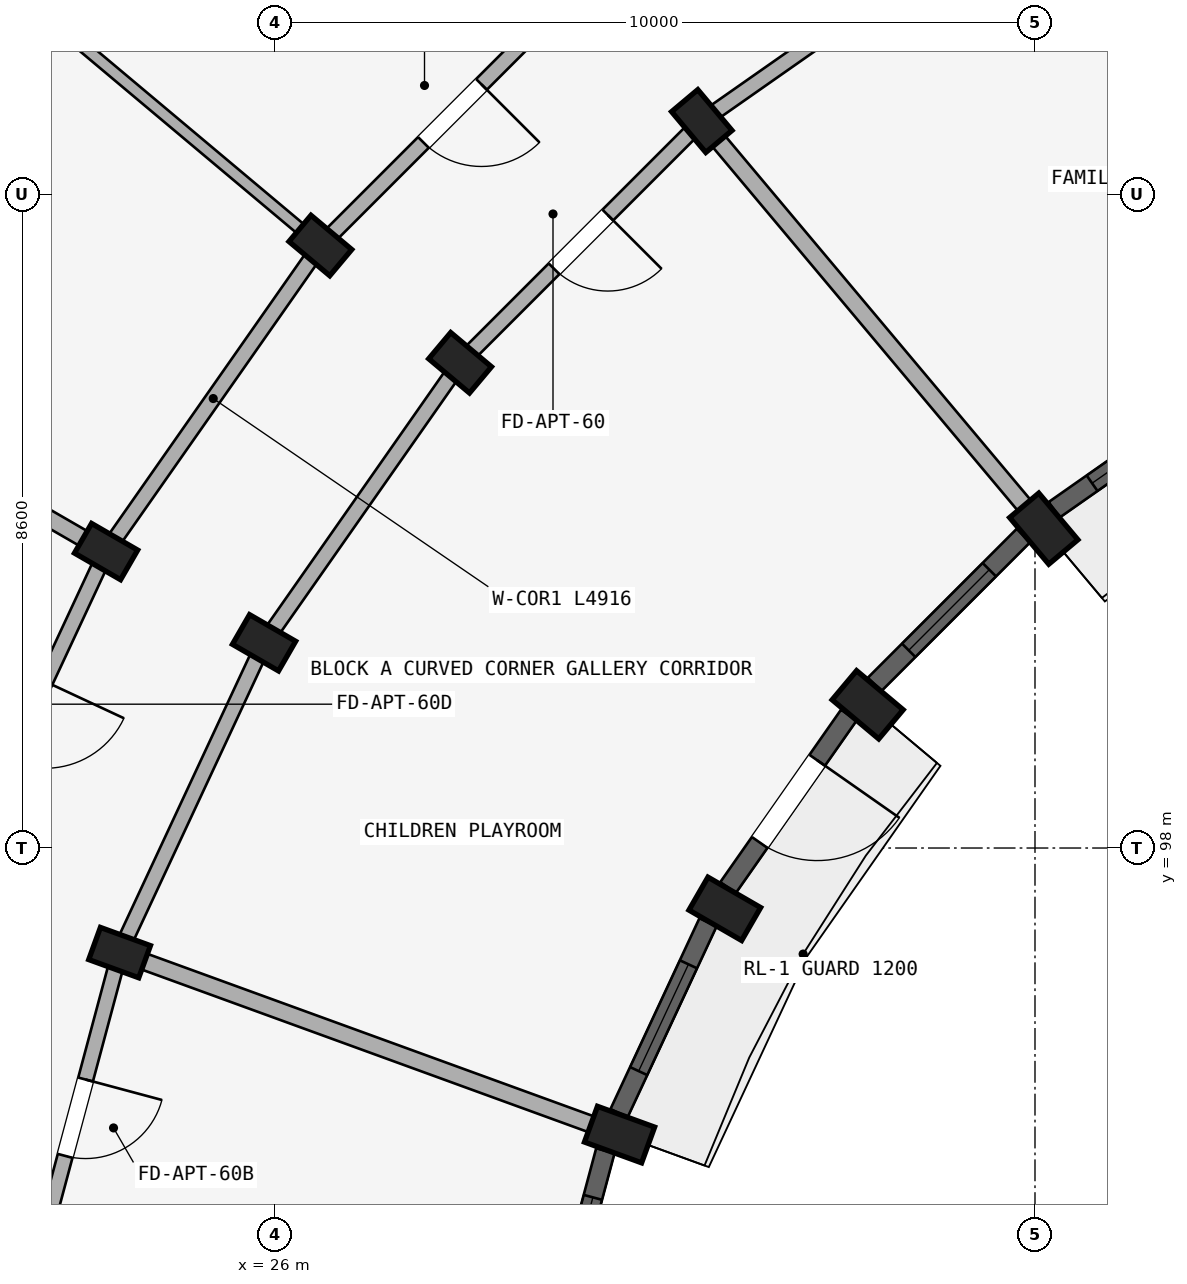
"""IFC4 building model, lengths in metres.
Left out: names, types, materials, properties, quantities, classifications, styles, units other than length and angle.
Written with IfcOpenShell. Run it as: python <this file> out.ifc"""

import sys

from ifc_helpers import new_model, si_unit, direction, frame, frame_2d, origin, origin_2d, place, context, subcontext, project, spatial, rectangle, extrude, element, fill, save


model = new_model("IFC4")
c1 = context("Model", 3, precision=1e-05, world=origin(), true_north=direction((0.0, 1.0)))
c2 = subcontext(c1, "Body", "Model", "MODEL_VIEW")
j1 = project(units=[si_unit("LENGTHUNIT", "METRE"), si_unit("PLANEANGLEUNIT", "RADIAN")], contexts=[c1])
p1 = place(None, origin())
s1 = spatial("IfcSite", under=j1, at=p1, CompositionType="ELEMENT")
p2 = place(p1, origin())
s2 = spatial("IfcBuilding", under=s1, at=p2, CompositionType="ELEMENT")
p3 = place(p2, frame((0.0, 0.0, 21.3)))
s3 = spatial("IfcBuildingStorey", under=s2, at=p3, CompositionType="ELEMENT", Elevation=21.3)
p4 = place(p3, frame((36.115, 102.202, 0.0), z_axis=(0.0, 0.0, 1.0), x_axis=(0.766044443119, 0.642787609687, 0.0)))
e1 = element("IfcColumn", 1, at=p4, inside=s3, PredefinedType="COLUMN", context=c2, shape_type="SweptSolid", body=[
    extrude(rectangle(XDim=0.5, YDim=0.8, at=origin_2d()), origin(), (0.0, 0.0, 1.0), 2.93),
])
p5 = place(p3, frame((31.616, 107.564, 0.0), z_axis=(0.0, 0.0, 1.0), x_axis=(0.766044443119, 0.642787609687, 0.0)))
e2 = element("IfcColumn", 2, at=p5, inside=s3, PredefinedType="COLUMN", context=c2, shape_type="SweptSolid", body=[
    extrude(rectangle(XDim=0.45, YDim=0.7, at=origin_2d()), origin(), (0.0, 0.0, 1.0), 2.93),
])
p6 = place(p3, frame((33.798, 99.885, 0.0), z_axis=(0.0, 0.0, 1.0), x_axis=(0.642787609687, 0.766044443119, 0.0)))
e3 = element("IfcColumn", 3, at=p6, inside=s3, PredefinedType="COLUMN", context=c2, shape_type="SweptSolid", body=[
    extrude(rectangle(XDim=0.5, YDim=0.8, at=origin_2d()), origin(), (0.0, 0.0, 1.0), 2.93),
])
for number, where, z_axis, x_axis in (
    (4, (28.436, 104.384, 0.0), (0.0, 0.0, 1.0), (0.643, 0.766, 0.0)),
    (5, (26.598, 105.927, 0.0), (0.0, 0.0, 1.0), (0.643, 0.766, 0.0)),
):
    element("IfcColumn", number, at=place(p3, frame(where, z_axis=z_axis, x_axis=x_axis)), inside=s3, PredefinedType="COLUMN", context=c2, shape_type="SweptSolid", body=[
        extrude(rectangle(XDim=0.45, YDim=0.7, at=origin_2d()), origin(), (0.0, 0.0, 1.0), 2.93),
    ])
p7 = place(p3, frame((31.919, 97.2, 0.0), z_axis=(0.0, 0.0, 1.0), x_axis=(0.5, 0.866025403784, 0.0)))
e6 = element("IfcColumn", 6, at=p7, inside=s3, PredefinedType="COLUMN", context=c2, shape_type="SweptSolid", body=[
    extrude(rectangle(XDim=0.5, YDim=0.8, at=origin_2d()), origin(), (0.0, 0.0, 1.0), 2.93),
])
for number, where, z_axis, x_axis in (
    (7, (25.856, 100.7, 0.0), (0.0, 0.0, 1.0), (0.5, 0.866, 0.0)),
    (8, (23.778, 101.9, 0.0), (0.0, 0.0, 1.0), (0.5, 0.866, 0.0)),
):
    element("IfcColumn", number, at=place(p3, frame(where, z_axis=z_axis, x_axis=x_axis)), inside=s3, PredefinedType="COLUMN", context=c2, shape_type="SweptSolid", body=[
        extrude(rectangle(XDim=0.45, YDim=0.7, at=origin_2d()), origin(), (0.0, 0.0, 1.0), 2.93),
    ])
p8 = place(p3, frame((30.534, 94.23, 0.0), z_axis=(0.0, 0.0, 1.0), x_axis=(0.342020143326, 0.939692620786, 0.0)))
e9 = element("IfcColumn", 9, at=p8, inside=s3, PredefinedType="COLUMN", context=c2, shape_type="SweptSolid", body=[
    extrude(rectangle(XDim=0.5, YDim=0.8, at=origin_2d()), origin(), (0.0, 0.0, 1.0), 2.93),
])
p9 = place(p3, frame((23.956, 96.624, 0.0), z_axis=(0.0, 0.0, 1.0), x_axis=(0.342020143326, 0.939692620786, 0.0)))
e10 = element("IfcColumn", 10, at=p9, inside=s3, PredefinedType="COLUMN", context=c2, shape_type="SweptSolid", body=[
    extrude(rectangle(XDim=0.45, YDim=0.7, at=origin_2d()), origin(), (0.0, 0.0, 1.0), 2.93),
])
p10 = place(p3, frame((35.3, 110.144, 0.0), z_axis=(0.0, 0.0, 1.0), x_axis=(-0.819155404658, -0.573571637217, 0.0)))
e11 = element("IfcWall", 11, at=p10, inside=s3, PredefinedType="STANDARD", context=c2, shape_type="SweptSolid", body=[
    extrude(rectangle(XDim=4.497, YDim=0.2, at=frame_2d((2.249, 0.0))), origin(), (0.0, 0.0, 1.0), 2.372),
])
p11 = place(p3, frame((31.616, 107.564, 0.0), z_axis=(0.0, 0.0, 1.0), x_axis=(-0.707106781187, -0.707106781187, 0.0)))
e12 = element("IfcWall", 12, at=p11, inside=s3, PredefinedType="STANDARD", context=c2, shape_type="SweptSolid", body=[
    extrude(rectangle(XDim=4.497, YDim=0.2, at=frame_2d((2.249, 0.0))), origin(), (0.0, 0.0, 1.0), 2.372),
])
p12 = place(p11, frame((1.749, 0.0, 0.0)))
e13 = element("IfcOpeningElement", 13, at=p12, cuts=e12, PredefinedType="OPENING", context=c2, shape_type="SweptSolid", body=[
    extrude(rectangle(XDim=1.0, YDim=2.15, at=frame_2d((0.5, 1.075))), frame((0.0, 0.11, 0.0), z_axis=(0.0, -1.0, 0.0), x_axis=(1.0, 0.0, 0.0)), (0.0, 0.0, 1.0), 0.22),
])
p13 = place(p3, frame((30.073, 109.402, 0.0), z_axis=(0.0, 0.0, 1.0), x_axis=(-0.707106781187, -0.707106781187, 0.0)))
e14 = element("IfcWall", 14, at=p13, inside=s3, PredefinedType="STANDARD", context=c2, shape_type="SweptSolid", body=[
    extrude(rectangle(XDim=4.916, YDim=0.2, at=frame_2d((2.458, 0.0))), origin(), (0.0, 0.0, 1.0), 2.372),
])
p14 = place(p13, frame((1.918, 0.0, 0.0)))
e15 = element("IfcOpeningElement", 15, at=p14, cuts=e14, PredefinedType="OPENING", context=c2, shape_type="SweptSolid", body=[
    extrude(rectangle(XDim=1.08, YDim=2.15, at=frame_2d((0.54, 1.075))), frame((0.0, 0.11, 0.0), z_axis=(0.0, -1.0, 0.0), x_axis=(1.0, 0.0, 0.0)), (0.0, 0.0, 1.0), 0.22),
])
p15 = place(p3, frame((28.436, 104.384, 0.0), z_axis=(0.0, 0.0, 1.0), x_axis=(-0.573571637217, -0.819155404658, 0.0)))
e16 = element("IfcWall", 16, at=p15, inside=s3, PredefinedType="STANDARD", context=c2, shape_type="SweptSolid", body=[
    extrude(rectangle(XDim=4.497, YDim=0.2, at=frame_2d((2.249, 0.0))), origin(), (0.0, 0.0, 1.0), 2.372),
])
p16 = place(p3, frame((26.598, 105.927, 0.0), z_axis=(0.0, 0.0, 1.0), x_axis=(-0.573592335331, -0.819140911474, 0.0)))
e17 = element("IfcWall", 17, at=p16, inside=s3, PredefinedType="STANDARD", context=c2, shape_type="SweptSolid", body=[
    extrude(rectangle(XDim=4.916, YDim=0.2, at=frame_2d((2.458, 0.0))), origin(), (0.0, 0.0, 1.0), 2.372),
])
p17 = place(p3, frame((25.856, 100.7, 0.0), z_axis=(0.0, 0.0, 1.0), x_axis=(-0.422617978463, -0.906307919131, 0.0)))
e18 = element("IfcWall", 18, at=p17, inside=s3, PredefinedType="STANDARD", context=c2, shape_type="SweptSolid", body=[
    extrude(rectangle(XDim=4.497, YDim=0.2, at=frame_2d((2.249, 0.0))), origin(), (0.0, 0.0, 1.0), 2.372),
])
p18 = place(p3, frame((23.778, 101.9, 0.0), z_axis=(0.0, 0.0, 1.0), x_axis=(-0.422629854778, -0.906302381024, 0.0)))
e19 = element("IfcWall", 19, at=p18, inside=s3, PredefinedType="STANDARD", context=c2, shape_type="SweptSolid", body=[
    extrude(rectangle(XDim=4.915, YDim=0.2, at=frame_2d((2.458, 0.0))), origin(), (0.0, 0.0, 1.0), 2.372),
])
p19 = place(p18, frame((1.888, 0.0, 0.0)))
e20 = element("IfcOpeningElement", 20, at=p19, cuts=e19, PredefinedType="OPENING", context=c2, shape_type="SweptSolid", body=[
    extrude(rectangle(XDim=1.14, YDim=2.15, at=frame_2d((0.57, 1.075))), frame((0.0, 0.11, 0.0), z_axis=(0.0, -1.0, 0.0), x_axis=(1.0, 0.0, 0.0)), (0.0, 0.0, 1.0), 0.22),
])
p20 = place(p3, frame((23.956, 96.624, 0.0), z_axis=(0.0, 0.0, 1.0), x_axis=(-0.258787642463, -0.965934240054, 0.0)))
e21 = element("IfcWall", 21, at=p20, inside=s3, PredefinedType="STANDARD", context=c2, shape_type="SweptSolid", body=[
    extrude(rectangle(XDim=4.497, YDim=0.2, at=frame_2d((2.249, 0.0))), origin(), (0.0, 0.0, 1.0), 2.372),
])
p21 = place(p20, frame((1.729, 0.0, 0.0)))
e22 = element("IfcOpeningElement", 22, at=p21, cuts=e21, PredefinedType="OPENING", context=c2, shape_type="SweptSolid", body=[
    extrude(rectangle(XDim=1.04, YDim=2.15, at=frame_2d((0.52, 1.075))), frame((0.0, 0.11, 0.0), z_axis=(0.0, -1.0, 0.0), x_axis=(1.0, 0.0, 0.0)), (0.0, 0.0, 1.0), 0.22),
])
p22 = place(p3, frame((35.987, 102.355, 0.0), z_axis=(0.0, 0.0, 1.0), x_axis=(-0.642784846501, 0.766046761698, 0.0)))
e23 = element("IfcWall", 23, at=p22, inside=s3, PredefinedType="STANDARD", context=c2, shape_type="SweptSolid", body=[
    extrude(rectangle(XDim=6.75, YDim=0.22, at=frame_2d((3.375, 0.0))), origin(), (0.0, 0.0, 1.0), 2.372),
])
p23 = place(p3, frame((26.521, 105.991, 0.0), z_axis=(0.0, 0.0, 1.0), x_axis=(-0.766046835987, 0.642784757967, 0.0)))
e24 = element("IfcWall", 24, at=p23, inside=s3, PredefinedType="PARTITIONING", context=c2, shape_type="SweptSolid", body=[
    extrude(rectangle(XDim=17.42, YDim=0.15, at=frame_2d((8.71, 0.0))), origin(), (0.0, 0.0, 1.0), 2.372),
])
p24 = place(p23, frame((4.45, 0.0, 0.0)))
e25 = element("IfcOpeningElement", 25, at=p24, cuts=e24, PredefinedType="OPENING", context=c2, shape_type="SweptSolid", body=[
    extrude(rectangle(XDim=0.8, YDim=2.1, at=frame_2d((0.4, 1.05))), frame((0.0, 0.085, 0.0), z_axis=(0.0, -1.0, 0.0), x_axis=(1.0, 0.0, 0.0)), (0.0, 0.0, 1.0), 0.17),
])
p25 = place(p3, frame((23.691, 101.95, 0.0), z_axis=(0.0, 0.0, 1.0), x_axis=(-0.866026648973, 0.499997843263, 0.0)))
e26 = element("IfcWall", 26, at=p25, inside=s3, PredefinedType="STANDARD", context=c2, shape_type="SweptSolid", body=[
    extrude(rectangle(XDim=17.42, YDim=0.22, at=frame_2d((8.71, 0.0))), origin(), (0.0, 0.0, 1.0), 2.372),
])
p26 = place(p3, frame((30.346, 94.298, 0.0), z_axis=(0.0, 0.0, 1.0), x_axis=(-0.939696231917, 0.342010221662, 0.0)))
e27 = element("IfcWall", 27, at=p26, inside=s3, PredefinedType="STANDARD", context=c2, shape_type="SweptSolid", body=[
    extrude(rectangle(XDim=6.75, YDim=0.22, at=frame_2d((3.375, 0.0))), origin(), (0.0, 0.0, 1.0), 2.372),
])
p27 = place(p3, frame((38.521, 104.038, 0.0), z_axis=(0.0, 0.0, 1.0), x_axis=(-0.819111815273, -0.573633885053, 0.0)))
e28 = element("IfcWall", 28, at=p27, inside=s3, PredefinedType="STANDARD", context=c2, shape_type="SweptSolid", body=[
    extrude(rectangle(XDim=2.77, YDim=0.25, at=frame_2d((1.385, 0.0))), origin(), (0.0, 0.0, 1.0), 2.472),
])
p28 = place(p27, frame((0.61, 0.0, 0.672)))
e29 = element("IfcOpeningElement", 29, at=p28, cuts=e28, PredefinedType="OPENING", context=c2, shape_type="SweptSolid", body=[
    extrude(rectangle(XDim=1.55, YDim=1.6, at=frame_2d((0.775, 0.8))), frame((0.0, 0.135, 0.0), z_axis=(0.0, -1.0, 0.0), x_axis=(1.0, 0.0, 0.0)), (0.0, 0.0, 1.0), 0.27),
])
p29 = place(p3, frame((35.848, 102.111, 0.0), z_axis=(0.0, 0.0, 1.0), x_axis=(-0.707106781187, -0.707106781187, 0.0)))
e30 = element("IfcWall", 30, at=p29, inside=s3, PredefinedType="STANDARD", context=c2, shape_type="SweptSolid", body=[
    extrude(rectangle(XDim=2.77, YDim=0.25, at=frame_2d((1.385, 0.0))), origin(), (0.0, 0.0, 1.0), 2.472),
])
p30 = place(p29, frame((0.635, 0.0, 0.622)))
e31 = element("IfcOpeningElement", 31, at=p30, cuts=e30, PredefinedType="OPENING", context=c2, shape_type="SweptSolid", body=[
    extrude(rectangle(XDim=1.5, YDim=1.65, at=frame_2d((0.75, 0.825))), frame((0.0, 0.135, 0.0), z_axis=(0.0, -1.0, 0.0), x_axis=(1.0, 0.0, 0.0)), (0.0, 0.0, 1.0), 0.27),
])
p31 = place(p3, frame((33.551, 99.748, 0.0), z_axis=(0.0, 0.0, 1.0), x_axis=(-0.573633885053, -0.819111815273, 0.0)))
e32 = element("IfcWall", 32, at=p31, inside=s3, PredefinedType="STANDARD", context=c2, shape_type="SweptSolid", body=[
    extrude(rectangle(XDim=2.77, YDim=0.25, at=frame_2d((1.385, 0.0))), origin(), (0.0, 0.0, 1.0), 2.472),
])
p32 = place(p31, frame((0.725, 0.0, 0.0)))
e33 = element("IfcOpeningElement", 33, at=p32, cuts=e32, PredefinedType="OPENING", context=c2, shape_type="SweptSolid", body=[
    extrude(rectangle(XDim=1.32, YDim=2.15, at=frame_2d((0.66, 1.075))), frame((0.0, 0.135, 0.0), z_axis=(0.0, -1.0, 0.0), x_axis=(1.0, 0.0, 0.0)), (0.0, 0.0, 1.0), 0.27),
])
p33 = place(p3, frame((31.698, 97.023, 0.0), z_axis=(0.0, 0.0, 1.0), x_axis=(-0.422649007088, -0.906293449611, 0.0)))
e34 = element("IfcWall", 34, at=p33, inside=s3, PredefinedType="STANDARD", context=c2, shape_type="SweptSolid", body=[
    extrude(rectangle(XDim=2.77, YDim=0.25, at=frame_2d((1.385, 0.0))), origin(), (0.0, 0.0, 1.0), 2.472),
])
p34 = place(p33, frame((0.61, 0.0, 0.672)))
e35 = element("IfcOpeningElement", 35, at=p34, cuts=e34, PredefinedType="OPENING", context=c2, shape_type="SweptSolid", body=[
    extrude(rectangle(XDim=1.55, YDim=1.6, at=frame_2d((0.775, 0.8))), frame((0.0, 0.135, 0.0), z_axis=(0.0, -1.0, 0.0), x_axis=(1.0, 0.0, 0.0)), (0.0, 0.0, 1.0), 0.27),
])
p35 = place(p3, frame((30.347, 94.017, 0.0), z_axis=(0.0, 0.0, 1.0), x_axis=(-0.25878161084, -0.965935855992, 0.0)))
e36 = element("IfcWall", 36, at=p35, inside=s3, PredefinedType="STANDARD", context=c2, shape_type="SweptSolid", body=[
    extrude(rectangle(XDim=2.77, YDim=0.25, at=frame_2d((1.385, 0.0))), origin(), (0.0, 0.0, 1.0), 2.472),
])
p36 = place(p35, frame((0.635, 0.0, 0.622)))
e37 = element("IfcOpeningElement", 37, at=p36, cuts=e36, PredefinedType="OPENING", context=c2, shape_type="SweptSolid", body=[
    extrude(rectangle(XDim=1.5, YDim=1.65, at=frame_2d((0.75, 0.825))), frame((0.0, 0.135, 0.0), z_axis=(0.0, -1.0, 0.0), x_axis=(1.0, 0.0, 0.0)), (0.0, 0.0, 1.0), 0.27),
])
p37 = place(p28, origin())
e38 = element("IfcWindow", 38, at=p37, inside=s3, PartitioningType="DOUBLE_PANEL_VERTICAL", PredefinedType="WINDOW", context=c2, shape_type="SweptSolid", body=[
    extrude(rectangle(XDim=1.55, YDim=1.6, at=frame_2d((0.775, 0.8))), frame((0.0, 0.03, 0.0), z_axis=(0.0, -1.0, 0.0), x_axis=(1.0, 0.0, 0.0)), (0.0, 0.0, 1.0), 0.06),
])
fill(e29, e38)
p38 = place(p30, origin())
e39 = element("IfcWindow", 39, at=p38, inside=s3, PartitioningType="DOUBLE_PANEL_VERTICAL", PredefinedType="WINDOW", context=c2, shape_type="SweptSolid", body=[
    extrude(rectangle(XDim=1.5, YDim=1.65, at=frame_2d((0.75, 0.825))), frame((0.0, 0.03, 0.0), z_axis=(0.0, -1.0, 0.0), x_axis=(1.0, 0.0, 0.0)), (0.0, 0.0, 1.0), 0.06),
])
fill(e31, e39)
p39 = place(p34, origin())
e40 = element("IfcWindow", 40, at=p39, inside=s3, PartitioningType="DOUBLE_PANEL_VERTICAL", PredefinedType="WINDOW", context=c2, shape_type="SweptSolid", body=[
    extrude(rectangle(XDim=1.55, YDim=1.6, at=frame_2d((0.775, 0.8))), frame((0.0, 0.03, 0.0), z_axis=(0.0, -1.0, 0.0), x_axis=(1.0, 0.0, 0.0)), (0.0, 0.0, 1.0), 0.06),
])
fill(e35, e40)
p40 = place(p36, origin())
e41 = element("IfcWindow", 41, at=p40, inside=s3, PartitioningType="DOUBLE_PANEL_VERTICAL", PredefinedType="WINDOW", context=c2, shape_type="SweptSolid", body=[
    extrude(rectangle(XDim=1.5, YDim=1.65, at=frame_2d((0.75, 0.825))), frame((0.0, 0.03, 0.0), z_axis=(0.0, -1.0, 0.0), x_axis=(1.0, 0.0, 0.0)), (0.0, 0.0, 1.0), 0.06),
])
fill(e37, e41)
p41 = place(p14, origin())
e42 = element("IfcDoor", 42, at=p41, inside=s3, OperationType="SINGLE_SWING_LEFT", PredefinedType="DOOR", context=c2, shape_type="SweptSolid", body=[
    extrude(rectangle(XDim=1.08, YDim=2.15, at=frame_2d((0.54, 1.075))), frame((0.0, 0.025, 0.0), z_axis=(0.0, -1.0, 0.0), x_axis=(1.0, 0.0, 0.0)), (0.0, 0.0, 1.0), 0.05),
])
fill(e15, e42)
p42 = place(p12, origin())
e43 = element("IfcDoor", 43, at=p42, inside=s3, OperationType="SINGLE_SWING_LEFT", PredefinedType="DOOR", context=c2, shape_type="SweptSolid", body=[
    extrude(rectangle(XDim=1.0, YDim=2.15, at=frame_2d((0.5, 1.075))), frame((0.0, 0.025, 0.0), z_axis=(0.0, -1.0, 0.0), x_axis=(1.0, 0.0, 0.0)), (0.0, 0.0, 1.0), 0.05),
])
fill(e13, e43)
p43 = place(p21, frame((1.04, 0.0, 0.0), z_axis=(0.0, 0.0, 1.0), x_axis=(-1.0, 0.0, 0.0)))
e44 = element("IfcDoor", 44, at=p43, inside=s3, OperationType="SINGLE_SWING_RIGHT", PredefinedType="DOOR", context=c2, shape_type="SweptSolid", body=[
    extrude(rectangle(XDim=1.04, YDim=2.15, at=frame_2d((0.52, 1.075))), frame((0.0, 0.025, 0.0), z_axis=(0.0, -1.0, 0.0), x_axis=(1.0, 0.0, 0.0)), (0.0, 0.0, 1.0), 0.05),
])
fill(e22, e44)
p44 = place(p32, origin())
e45 = element("IfcDoor", 45, at=p44, inside=s3, OperationType="SINGLE_SWING_LEFT", PredefinedType="DOOR", context=c2, shape_type="SweptSolid", body=[
    extrude(rectangle(XDim=1.32, YDim=2.15, at=frame_2d((0.66, 1.075))), frame((0.0, 0.025, 0.0), z_axis=(0.0, -1.0, 0.0), x_axis=(1.0, 0.0, 0.0)), (0.0, 0.0, 1.0), 0.05),
])
fill(e33, e45)
save(model, sys.argv[1])
